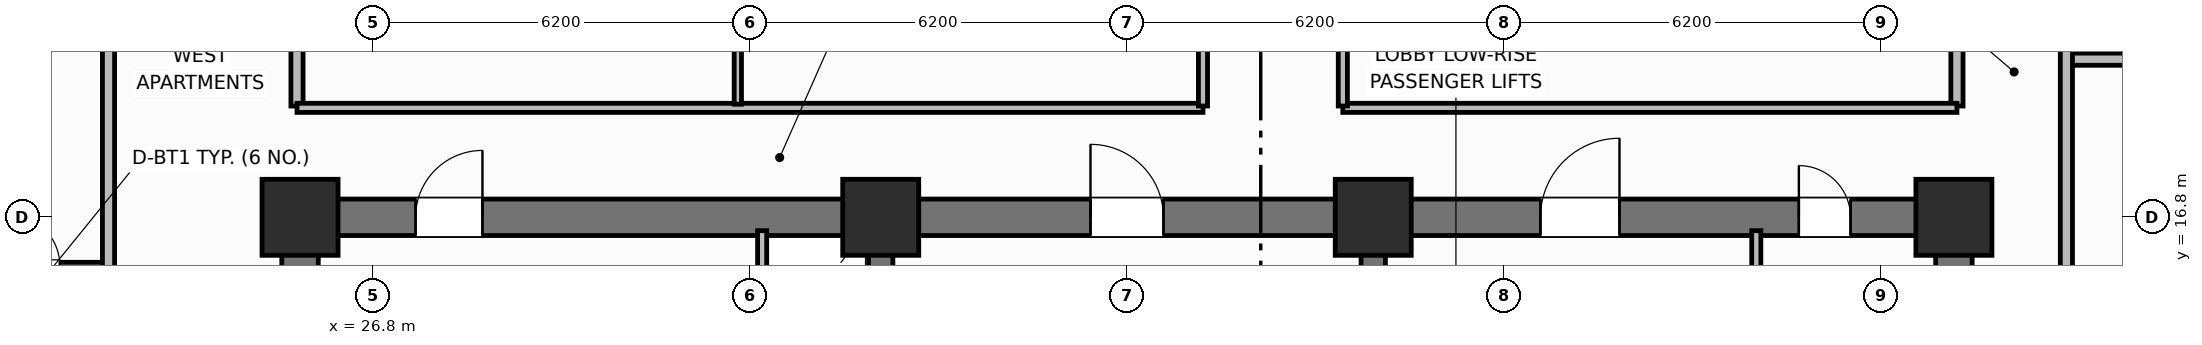
"""IFC4 building model, lengths in metres.
Left out: names, types, materials, properties, quantities, classifications, styles, units other than length and angle.
Written with IfcOpenShell. Run it as: python <this file> out.ifc"""

import sys

from ifc_helpers import new_model, si_unit, direction, frame, frame_2d, origin, origin_2d, place, context, subcontext, project, spatial, rectangle, extrude, element, fill, save


model = new_model("IFC4")
c1 = context("Model", 3, precision=1e-05, world=origin(), true_north=direction((0.0, 1.0)))
c2 = subcontext(c1, "Body", "Model", "MODEL_VIEW")
j1 = project(units=[si_unit("LENGTHUNIT", "METRE"), si_unit("PLANEANGLEUNIT", "RADIAN")], contexts=[c1])
p1 = place(None, origin())
s1 = spatial("IfcSite", under=j1, at=p1, CompositionType="ELEMENT")
p2 = place(p1, origin())
s2 = spatial("IfcBuilding", under=s1, at=p2, CompositionType="ELEMENT")
p3 = place(p2, frame((0.0, 0.0, 62.1)))
s3 = spatial("IfcBuildingStorey", under=s2, at=p3, CompositionType="ELEMENT", Elevation=62.1)
for number, where, z_axis, x_axis in (
    (1, (25.6, 10.9, 0.0), (0.0, 0.0, 1.0), (0.0, 1.0, 0.0)),
    (2, (52.8, 10.9, 0.0), (0.0, 0.0, 1.0), (0.0, 1.0, 0.0)),
):
    element("IfcWall", number, at=place(p3, frame(where, z_axis=z_axis, x_axis=x_axis)), inside=s3, PredefinedType="SHEAR", context=c2, shape_type="SweptSolid", body=[
        extrude(rectangle(XDim=5.6, YDim=0.6, at=frame_2d((2.8, 0.0))), origin(), (0.0, 0.0, 1.0), 3.7),
    ])
p4 = place(p3, frame((25.6, 16.8, 0.0), z_axis=(0.0, 0.0, 1.0), x_axis=(1.0, 0.0, 0.0)))
e3 = element("IfcWall", 3, at=p4, inside=s3, PredefinedType="SHEAR", context=c2, shape_type="SweptSolid", body=[
    extrude(rectangle(XDim=27.2, YDim=0.6, at=frame_2d((13.6, 0.0))), origin(), (0.0, 0.0, 1.0), 3.7),
])
p5 = place(p4, frame((1.9, 0.0, 0.0)))
e4 = element("IfcOpeningElement", 4, at=p5, cuts=e3, PredefinedType="OPENING", context=c2, shape_type="SweptSolid", body=[
    extrude(rectangle(XDim=1.1, YDim=2.15, at=frame_2d((0.55, 1.075))), frame((0.0, 0.31, 0.0), z_axis=(0.0, -1.0, 0.0), x_axis=(1.0, 0.0, 0.0)), (0.0, 0.0, 1.0), 0.62),
])
p6 = place(p4, frame((13.0, 0.0, 0.0)))
e5 = element("IfcOpeningElement", 5, at=p6, cuts=e3, PredefinedType="OPENING", context=c2, shape_type="SweptSolid", body=[
    extrude(rectangle(XDim=1.2, YDim=2.15, at=frame_2d((0.6, 1.075))), frame((0.0, 0.31, 0.0), z_axis=(0.0, -1.0, 0.0), x_axis=(1.0, 0.0, 0.0)), (0.0, 0.0, 1.0), 0.62),
])
p7 = place(p4, frame((20.4, 0.0, 0.0)))
e6 = element("IfcOpeningElement", 6, at=p7, cuts=e3, PredefinedType="OPENING", context=c2, shape_type="SweptSolid", body=[
    extrude(rectangle(XDim=1.3, YDim=2.2, at=frame_2d((0.65, 1.1))), frame((0.0, 0.31, 0.0), z_axis=(0.0, -1.0, 0.0), x_axis=(1.0, 0.0, 0.0)), (0.0, 0.0, 1.0), 0.62),
])
p8 = place(p4, frame((24.65, 0.0, 0.0)))
e7 = element("IfcOpeningElement", 7, at=p8, cuts=e3, PredefinedType="OPENING", context=c2, shape_type="SweptSolid", body=[
    extrude(rectangle(XDim=0.85, YDim=2.1, at=frame_2d((0.425, 1.05))), frame((0.0, 0.31, 0.0), z_axis=(0.0, -1.0, 0.0), x_axis=(1.0, 0.0, 0.0)), (0.0, 0.0, 1.0), 0.62),
])
for number, where, z_axis, x_axis in (
    (8, (35.15, 10.9, 0.0), (0.0, 0.0, 1.0), (0.0, 1.0, 0.0)),
    (9, (43.25, 10.9, 0.0), (0.0, 0.0, 1.0), (0.0, 1.0, 0.0)),
):
    element("IfcWall", number, at=place(p3, frame(where, z_axis=z_axis, x_axis=x_axis)), inside=s3, PredefinedType="SHEAR", context=c2, shape_type="SweptSolid", body=[
        extrude(rectangle(XDim=5.6, YDim=0.4, at=frame_2d((2.8, 0.0))), origin(), (0.0, 0.0, 1.0), 3.7),
    ])
for number, where, z_axis, x_axis in (
    (10, (25.6, 16.8, 0.0), (0.0, 0.0, 1.0), (1.0, 0.0, 0.0)),
    (11, (35.15, 16.8, 0.0), (0.0, 0.0, 1.0), (1.0, 0.0, 0.0)),
    (12, (43.25, 16.8, 0.0), (0.0, 0.0, 1.0), (1.0, 0.0, 0.0)),
    (13, (52.8, 16.8, 0.0), (0.0, 0.0, 1.0), (1.0, 0.0, 0.0)),
):
    element("IfcColumn", number, at=place(p3, frame(where, z_axis=z_axis, x_axis=x_axis)), inside=s3, PredefinedType="COLUMN", context=c2, shape_type="SweptSolid", body=[
        extrude(rectangle(XDim=1.25, YDim=1.25, at=origin_2d()), origin(), (0.0, 0.0, 1.0), 3.7),
    ])
p9 = place(p3, frame((33.2, 14.5, 0.0), z_axis=(0.0, 0.0, 1.0), x_axis=(0.0, 1.0, 0.0)))
e14 = element("IfcWall", 14, at=p9, inside=s3, PredefinedType="PARTITIONING", context=c2, shape_type="SweptSolid", body=[
    extrude(rectangle(XDim=2.08, YDim=0.15, at=frame_2d((1.04, 0.0))), origin(), (0.0, 0.0, 1.0), 2.53),
])
p10 = place(p9, frame((0.55, 0.0, 0.0)))
e15 = element("IfcOpeningElement", 15, at=p10, cuts=e14, PredefinedType="OPENING", context=c2, shape_type="SweptSolid", body=[
    extrude(rectangle(XDim=0.85, YDim=2.05, at=frame_2d((0.425, 1.025))), frame((0.0, 0.085, 0.0), z_axis=(0.0, -1.0, 0.0), x_axis=(1.0, 0.0, 0.0)), (0.0, 0.0, 1.0), 0.17),
])
p11 = place(p3, frame((49.55, 13.7, 0.0), z_axis=(0.0, 0.0, 1.0), x_axis=(0.0, 1.0, 0.0)))
e16 = element("IfcWall", 16, at=p11, inside=s3, PredefinedType="PARTITIONING", context=c2, shape_type="SweptSolid", body=[
    extrude(rectangle(XDim=2.88, YDim=0.15, at=frame_2d((1.44, 0.0))), origin(), (0.0, 0.0, 1.0), 2.53),
])
for number, where, z_axis, x_axis in (
    (17, (25.55, 18.63, 0.0), (0.0, 0.0, 1.0), (0.0, 1.0, 0.0)),
    (18, (52.85, 18.63, 0.0), (0.0, 0.0, 1.0), (0.0, 1.0, 0.0)),
):
    element("IfcWall", number, at=place(p3, frame(where, z_axis=z_axis, x_axis=x_axis)), inside=s3, PredefinedType="PARTITIONING", context=c2, shape_type="SweptSolid", body=[
        extrude(rectangle(XDim=19.14, YDim=0.2, at=frame_2d((9.57, 0.0))), origin(), (0.0, 0.0, 1.0), 2.53),
    ])
p12 = place(p3, frame((25.55, 18.6, 0.0), z_axis=(0.0, 0.0, 1.0), x_axis=(1.0, 0.0, 0.0)))
e19 = element("IfcWall", 19, at=p12, inside=s3, PredefinedType="PARTITIONING", context=c2, shape_type="SweptSolid", body=[
    extrude(rectangle(XDim=14.9, YDim=0.15, at=frame_2d((7.45, 0.0))), origin(), (0.0, 0.0, 1.0), 2.53),
])
p13 = place(p3, frame((42.75, 18.6, 0.0), z_axis=(0.0, 0.0, 1.0), x_axis=(1.0, 0.0, 0.0)))
e20 = element("IfcWall", 20, at=p13, inside=s3, PredefinedType="PARTITIONING", context=c2, shape_type="SweptSolid", body=[
    extrude(rectangle(XDim=10.1, YDim=0.15, at=frame_2d((5.05, 0.0))), origin(), (0.0, 0.0, 1.0), 2.53),
])
p14 = place(p3, frame((32.8, 18.66, 0.0), z_axis=(0.0, 0.0, 1.0), x_axis=(0.0, 1.0, 0.0)))
e21 = element("IfcWall", 21, at=p14, inside=s3, PredefinedType="PARTITIONING", context=c2, shape_type="SweptSolid", body=[
    extrude(rectangle(XDim=9.49, YDim=0.12, at=frame_2d((4.745, 0.0))), origin(), (0.0, 0.0, 1.0), 2.53),
])
p15 = place(p14, frame((2.2, 0.0, 0.0)))
e22 = element("IfcOpeningElement", 22, at=p15, cuts=e21, PredefinedType="OPENING", context=c2, shape_type="SweptSolid", body=[
    extrude(rectangle(XDim=0.9, YDim=2.1, at=frame_2d((0.45, 1.05))), frame((0.0, 0.07, 0.0), z_axis=(0.0, -1.0, 0.0), x_axis=(1.0, 0.0, 0.0)), (0.0, 0.0, 1.0), 0.14),
])
p16 = place(p3, frame((40.45, 18.63, 0.0), z_axis=(0.0, 0.0, 1.0), x_axis=(0.0, 1.0, 0.0)))
e23 = element("IfcWall", 23, at=p16, inside=s3, PredefinedType="PARTITIONING", context=c2, shape_type="SweptSolid", body=[
    extrude(rectangle(XDim=19.14, YDim=0.15, at=frame_2d((9.57, 0.0))), origin(), (0.0, 0.0, 1.0), 2.53),
])
p17 = place(p16, frame((2.4, 0.0, 0.0)))
e24 = element("IfcOpeningElement", 24, at=p17, cuts=e23, PredefinedType="OPENING", context=c2, shape_type="SweptSolid", body=[
    extrude(rectangle(XDim=1.0, YDim=2.15, at=frame_2d((0.5, 1.075))), frame((0.0, 0.085, 0.0), z_axis=(0.0, -1.0, 0.0), x_axis=(1.0, 0.0, 0.0)), (0.0, 0.0, 1.0), 0.17),
])
p18 = place(p16, frame((11.4, 0.0, 0.0)))
e25 = element("IfcOpeningElement", 25, at=p18, cuts=e23, PredefinedType="OPENING", context=c2, shape_type="SweptSolid", body=[
    extrude(rectangle(XDim=1.0, YDim=2.15, at=frame_2d((0.5, 1.075))), frame((0.0, 0.085, 0.0), z_axis=(0.0, -1.0, 0.0), x_axis=(1.0, 0.0, 0.0)), (0.0, 0.0, 1.0), 0.17),
])
p19 = place(p3, frame((42.75, 18.63, 0.0), z_axis=(0.0, 0.0, 1.0), x_axis=(0.0, 1.0, 0.0)))
e26 = element("IfcWall", 26, at=p19, inside=s3, PredefinedType="PARTITIONING", context=c2, shape_type="SweptSolid", body=[
    extrude(rectangle(XDim=19.14, YDim=0.15, at=frame_2d((9.57, 0.0))), origin(), (0.0, 0.0, 1.0), 2.53),
])
p20 = place(p19, frame((5.5, 0.0, 0.0)))
e27 = element("IfcOpeningElement", 27, at=p20, cuts=e26, PredefinedType="OPENING", context=c2, shape_type="SweptSolid", body=[
    extrude(rectangle(XDim=1.0, YDim=2.15, at=frame_2d((0.5, 1.075))), frame((0.0, 0.085, 0.0), z_axis=(0.0, -1.0, 0.0), x_axis=(1.0, 0.0, 0.0)), (0.0, 0.0, 1.0), 0.17),
])
p21 = place(p3, frame((20.2, 16.0, 0.0), z_axis=(0.0, 0.0, 1.0), x_axis=(1.0, 0.0, 0.0)))
e28 = element("IfcWall", 28, at=p21, inside=s3, PredefinedType="PARTITIONING", context=c2, shape_type="SweptSolid", body=[
    extrude(rectangle(XDim=2.25, YDim=0.12, at=frame_2d((1.125, 0.0))), origin(), (0.0, 0.0, 1.0), 2.53),
])
p22 = place(p21, frame((0.6, 0.0, 0.0)))
e29 = element("IfcOpeningElement", 29, at=p22, cuts=e28, PredefinedType="OPENING", context=c2, shape_type="SweptSolid", body=[
    extrude(rectangle(XDim=0.85, YDim=2.1, at=frame_2d((0.425, 1.05))), frame((0.0, 0.07, 0.0), z_axis=(0.0, -1.0, 0.0), x_axis=(1.0, 0.0, 0.0)), (0.0, 0.0, 1.0), 0.14),
])
p23 = place(p3, frame((22.45, 10.6, 0.0), z_axis=(0.0, 0.0, 1.0), x_axis=(0.0, 1.0, 0.0)))
e30 = element("IfcWall", 30, at=p23, inside=s3, PredefinedType="PARTITIONING", context=c2, shape_type="SweptSolid", body=[
    extrude(rectangle(XDim=35.2, YDim=0.2, at=frame_2d((17.6, 0.0))), origin(), (0.0, 0.0, 1.0), 2.53),
])
p24 = place(p23, frame((2.65, 0.0, 0.0)))
e31 = element("IfcOpeningElement", 31, at=p24, cuts=e30, PredefinedType="OPENING", context=c2, shape_type="SweptSolid", body=[
    extrude(rectangle(XDim=1.0, YDim=2.15, at=frame_2d((0.5, 1.075))), frame((0.0, 0.11, 0.0), z_axis=(0.0, -1.0, 0.0), x_axis=(1.0, 0.0, 0.0)), (0.0, 0.0, 1.0), 0.22),
])
p25 = place(p23, frame((19.438, 0.0, 0.0)))
e32 = element("IfcOpeningElement", 32, at=p25, cuts=e30, PredefinedType="OPENING", context=c2, shape_type="SweptSolid", body=[
    extrude(rectangle(XDim=1.0, YDim=2.15, at=frame_2d((0.5, 1.075))), frame((0.0, 0.11, 0.0), z_axis=(0.0, -1.0, 0.0), x_axis=(1.0, 0.0, 0.0)), (0.0, 0.0, 1.0), 0.22),
])
p26 = place(p3, frame((54.65, 19.4, 0.0), z_axis=(0.0, 0.0, 1.0), x_axis=(1.0, 0.0, 0.0)))
e33 = element("IfcWall", 33, at=p26, inside=s3, PredefinedType="PARTITIONING", context=c2, shape_type="SweptSolid", body=[
    extrude(rectangle(XDim=9.18, YDim=0.2, at=frame_2d((4.59, 0.0))), origin(), (0.0, 0.0, 1.0), 2.53),
])
p27 = place(p3, frame((54.65, 10.6, 0.0), z_axis=(0.0, 0.0, 1.0), x_axis=(0.0, 1.0, 0.0)))
e34 = element("IfcWall", 34, at=p27, inside=s3, PredefinedType="PARTITIONING", context=c2, shape_type="SweptSolid", body=[
    extrude(rectangle(XDim=35.2, YDim=0.2, at=frame_2d((17.6, 0.0))), origin(), (0.0, 0.0, 1.0), 2.53),
])
p28 = place(p27, frame((2.65, 0.0, 0.0)))
e35 = element("IfcOpeningElement", 35, at=p28, cuts=e34, PredefinedType="OPENING", context=c2, shape_type="SweptSolid", body=[
    extrude(rectangle(XDim=1.0, YDim=2.15, at=frame_2d((0.5, 1.075))), frame((0.0, 0.11, 0.0), z_axis=(0.0, -1.0, 0.0), x_axis=(1.0, 0.0, 0.0)), (0.0, 0.0, 1.0), 0.22),
])
p29 = place(p27, frame((10.81, 0.0, 0.0)))
e36 = element("IfcOpeningElement", 36, at=p29, cuts=e34, PredefinedType="OPENING", context=c2, shape_type="SweptSolid", body=[
    extrude(rectangle(XDim=1.0, YDim=2.15, at=frame_2d((0.5, 1.075))), frame((0.0, 0.11, 0.0), z_axis=(0.0, -1.0, 0.0), x_axis=(1.0, 0.0, 0.0)), (0.0, 0.0, 1.0), 0.22),
])
p30 = place(p27, frame((19.54, 0.0, 0.0)))
e37 = element("IfcOpeningElement", 37, at=p30, cuts=e34, PredefinedType="OPENING", context=c2, shape_type="SweptSolid", body=[
    extrude(rectangle(XDim=1.0, YDim=2.15, at=frame_2d((0.5, 1.075))), frame((0.0, 0.11, 0.0), z_axis=(0.0, -1.0, 0.0), x_axis=(1.0, 0.0, 0.0)), (0.0, 0.0, 1.0), 0.22),
])
p31 = place(p27, frame((26.95, 0.0, 0.0)))
e38 = element("IfcOpeningElement", 38, at=p31, cuts=e34, PredefinedType="OPENING", context=c2, shape_type="SweptSolid", body=[
    extrude(rectangle(XDim=1.0, YDim=2.15, at=frame_2d((0.5, 1.075))), frame((0.0, 0.11, 0.0), z_axis=(0.0, -1.0, 0.0), x_axis=(1.0, 0.0, 0.0)), (0.0, 0.0, 1.0), 0.22),
])
p32 = place(p22, origin())
e39 = element("IfcDoor", 39, at=p32, inside=s3, OperationType="SINGLE_SWING_LEFT", PredefinedType="DOOR", context=c2, shape_type="SweptSolid", body=[
    extrude(rectangle(XDim=0.85, YDim=2.1, at=frame_2d((0.425, 1.05))), frame((0.0, 0.025, 0.0), z_axis=(0.0, -1.0, 0.0), x_axis=(1.0, 0.0, 0.0)), (0.0, 0.0, 1.0), 0.05),
])
fill(e29, e39)
p33 = place(p5, origin())
e40 = element("IfcDoor", 40, at=p33, inside=s3, OperationType="SINGLE_SWING_RIGHT", PredefinedType="DOOR", context=c2, shape_type="SweptSolid", body=[
    extrude(rectangle(XDim=1.1, YDim=2.15, at=frame_2d((0.55, 1.075))), frame((0.0, 0.025, 0.0), z_axis=(0.0, -1.0, 0.0), x_axis=(1.0, 0.0, 0.0)), (0.0, 0.0, 1.0), 0.05),
])
fill(e4, e40)
p34 = place(p6, origin())
e41 = element("IfcDoor", 41, at=p34, inside=s3, OperationType="SINGLE_SWING_LEFT", PredefinedType="DOOR", context=c2, shape_type="SweptSolid", body=[
    extrude(rectangle(XDim=1.2, YDim=2.15, at=frame_2d((0.6, 1.075))), frame((0.0, 0.025, 0.0), z_axis=(0.0, -1.0, 0.0), x_axis=(1.0, 0.0, 0.0)), (0.0, 0.0, 1.0), 0.05),
])
fill(e5, e41)
p35 = place(p7, origin())
e42 = element("IfcDoor", 42, at=p35, inside=s3, OperationType="SINGLE_SWING_RIGHT", PredefinedType="DOOR", context=c2, shape_type="SweptSolid", body=[
    extrude(rectangle(XDim=1.3, YDim=2.2, at=frame_2d((0.65, 1.1))), frame((0.0, 0.025, 0.0), z_axis=(0.0, -1.0, 0.0), x_axis=(1.0, 0.0, 0.0)), (0.0, 0.0, 1.0), 0.05),
])
fill(e6, e42)
p36 = place(p8, origin())
e43 = element("IfcDoor", 43, at=p36, inside=s3, OperationType="SINGLE_SWING_LEFT", PredefinedType="DOOR", context=c2, shape_type="SweptSolid", body=[
    extrude(rectangle(XDim=0.85, YDim=2.1, at=frame_2d((0.425, 1.05))), frame((0.0, 0.025, 0.0), z_axis=(0.0, -1.0, 0.0), x_axis=(1.0, 0.0, 0.0)), (0.0, 0.0, 1.0), 0.05),
])
fill(e7, e43)
save(model, sys.argv[1])
